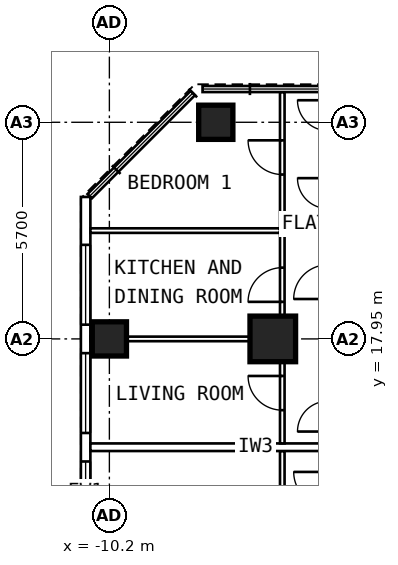
"""IFC4 building model, lengths in metres.
Left out: names, types, materials, properties, quantities, classifications, styles, units other than length and angle.
Written with IfcOpenShell. Run it as: python <this file> out.ifc"""

import sys

from ifc_helpers import new_model, si_unit, direction, frame, frame_2d, origin, origin_2d, place, context, subcontext, project, spatial, rectangle, extrude, element, fill, save


model = new_model("IFC4")
c1 = context("Model", 3, precision=1e-05, world=origin(), true_north=direction((0.0, 1.0)))
c2 = subcontext(c1, "Body", "Model", "MODEL_VIEW")
j1 = project(units=[si_unit("LENGTHUNIT", "METRE"), si_unit("PLANEANGLEUNIT", "RADIAN")], contexts=[c1])
p1 = place(None, origin())
s1 = spatial("IfcSite", under=j1, at=p1, CompositionType="ELEMENT")
p2 = place(p1, origin())
s2 = spatial("IfcBuilding", under=s1, at=p2, CompositionType="ELEMENT")
p3 = place(p2, frame((0.0, 0.0, 172.4)))
s3 = spatial("IfcBuildingStorey", under=s2, at=p3, CompositionType="ELEMENT", Elevation=172.4)
for number, where, z_axis, x_axis in (
    (1, (-10.2, 17.95, 0.0), (0.0, 0.0, 1.0), (0.0, 1.0, 0.0)),
    (2, (-7.4, 23.65, 0.0), (0.0, 0.0, 1.0), (0.0, 1.0, 0.0)),
):
    element("IfcColumn", number, at=place(p3, frame(where, z_axis=z_axis, x_axis=x_axis)), inside=s3, PredefinedType="COLUMN", context=c2, shape_type="SweptSolid", body=[
        extrude(rectangle(XDim=0.9, YDim=0.9, at=origin_2d()), origin(), (0.0, 0.0, 1.0), 3.6),
    ])
p4 = place(p3, frame((-5.9, 17.95, 0.0), z_axis=(0.0, 0.0, 1.0), x_axis=(0.0, 1.0, 0.0)))
e3 = element("IfcColumn", 3, at=p4, inside=s3, PredefinedType="COLUMN", context=c2, shape_type="SweptSolid", body=[
    extrude(rectangle(XDim=1.2, YDim=1.2, at=origin_2d()), origin(), (0.0, 0.0, 1.0), 3.6),
])
p5 = place(p3, frame((-10.825, 6.148, 0.0), z_axis=(0.0, 0.0, 1.0), x_axis=(0.0, 1.0, 0.0)))
e4 = element("IfcWall", 4, at=p5, inside=s3, PredefinedType="SOLIDWALL", context=c2, shape_type="SweptSolid", body=[
    extrude(rectangle(XDim=15.537, YDim=0.25, at=frame_2d((7.769, 0.0))), origin(), (0.0, 0.0, 1.0), 3.35),
])
p6 = place(p5, frame((0.777, 0.0, 0.8)))
e5 = element("IfcOpeningElement", 5, at=p6, cuts=e4, PredefinedType="OPENING", context=c2, shape_type="SweptSolid", body=[
    extrude(rectangle(XDim=2.1, YDim=1.8, at=frame_2d((1.05, 0.9))), frame((0.0, 0.137, 0.0), z_axis=(0.0, -1.0, 0.0), x_axis=(1.0, 0.0, 0.0)), (0.0, 0.0, 1.0), 0.274),
])
p7 = place(p5, frame((3.627, 0.0, 0.8)))
e6 = element("IfcOpeningElement", 6, at=p7, cuts=e4, PredefinedType="OPENING", context=c2, shape_type="SweptSolid", body=[
    extrude(rectangle(XDim=2.1, YDim=1.8, at=frame_2d((1.05, 0.9))), frame((0.0, 0.137, 0.0), z_axis=(0.0, -1.0, 0.0), x_axis=(1.0, 0.0, 0.0)), (0.0, 0.0, 1.0), 0.274),
])
p8 = place(p5, frame((6.477, 0.0, 0.8)))
e7 = element("IfcOpeningElement", 7, at=p8, cuts=e4, PredefinedType="OPENING", context=c2, shape_type="SweptSolid", body=[
    extrude(rectangle(XDim=2.1, YDim=1.8, at=frame_2d((1.05, 0.9))), frame((0.0, 0.137, 0.0), z_axis=(0.0, -1.0, 0.0), x_axis=(1.0, 0.0, 0.0)), (0.0, 0.0, 1.0), 0.274),
])
p9 = place(p5, frame((9.327, 0.0, 0.8)))
e8 = element("IfcOpeningElement", 8, at=p9, cuts=e4, PredefinedType="OPENING", context=c2, shape_type="SweptSolid", body=[
    extrude(rectangle(XDim=2.1, YDim=1.8, at=frame_2d((1.05, 0.9))), frame((0.0, 0.137, 0.0), z_axis=(0.0, -1.0, 0.0), x_axis=(1.0, 0.0, 0.0)), (0.0, 0.0, 1.0), 0.274),
])
p10 = place(p5, frame((12.177, 0.0, 0.8)))
e9 = element("IfcOpeningElement", 9, at=p10, cuts=e4, PredefinedType="OPENING", context=c2, shape_type="SweptSolid", body=[
    extrude(rectangle(XDim=2.1, YDim=1.8, at=frame_2d((1.05, 0.9))), frame((0.0, 0.137, 0.0), z_axis=(0.0, -1.0, 0.0), x_axis=(1.0, 0.0, 0.0)), (0.0, 0.0, 1.0), 0.274),
])
p11 = place(p3, frame((-5.65, 9.6, 0.0), z_axis=(0.0, 0.0, 1.0), x_axis=(0.0, 1.0, 0.0)))
e10 = element("IfcWall", 10, at=p11, inside=s3, PredefinedType="PARTITIONING", context=c2, shape_type="SweptSolid", body=[
    extrude(rectangle(XDim=5.4, YDim=0.12, at=frame_2d((2.7, 0.0))), origin(), (0.0, 0.0, 1.0), 3.35),
])
p12 = place(p11, frame((3.4, 0.0, 0.0)))
e11 = element("IfcOpeningElement", 11, at=p12, cuts=e10, PredefinedType="OPENING", context=c2, shape_type="SweptSolid", body=[
    extrude(rectangle(XDim=0.9, YDim=2.1, at=frame_2d((0.45, 1.05))), frame((0.0, 0.072, 0.0), z_axis=(0.0, -1.0, 0.0), x_axis=(1.0, 0.0, 0.0)), (0.0, 0.0, 1.0), 0.144),
])
p13 = place(p3, frame((-5.65, 15.2, 0.0), z_axis=(0.0, 0.0, 1.0), x_axis=(0.0, 1.0, 0.0)))
e12 = element("IfcWall", 12, at=p13, inside=s3, PredefinedType="PARTITIONING", context=c2, shape_type="SweptSolid", body=[
    extrude(rectangle(XDim=9.245, YDim=0.12, at=frame_2d((4.623, 0.0))), origin(), (0.0, 0.0, 1.0), 3.35),
])
p14 = place(p13, frame((0.875, 0.0, 0.0)))
e13 = element("IfcOpeningElement", 13, at=p14, cuts=e12, PredefinedType="OPENING", context=c2, shape_type="SweptSolid", body=[
    extrude(rectangle(XDim=0.9, YDim=2.1, at=frame_2d((0.45, 1.05))), frame((0.0, 0.072, 0.0), z_axis=(0.0, -1.0, 0.0), x_axis=(1.0, 0.0, 0.0)), (0.0, 0.0, 1.0), 0.144),
])
p15 = place(p13, frame((3.725, 0.0, 0.0)))
e14 = element("IfcOpeningElement", 14, at=p15, cuts=e12, PredefinedType="OPENING", context=c2, shape_type="SweptSolid", body=[
    extrude(rectangle(XDim=0.9, YDim=2.1, at=frame_2d((0.45, 1.05))), frame((0.0, 0.072, 0.0), z_axis=(0.0, -1.0, 0.0), x_axis=(1.0, 0.0, 0.0)), (0.0, 0.0, 1.0), 0.144),
])
p16 = place(p13, frame((7.075, 0.0, 0.0)))
e15 = element("IfcOpeningElement", 15, at=p16, cuts=e12, PredefinedType="OPENING", context=c2, shape_type="SweptSolid", body=[
    extrude(rectangle(XDim=0.9, YDim=2.1, at=frame_2d((0.45, 1.05))), frame((0.0, 0.072, 0.0), z_axis=(0.0, -1.0, 0.0), x_axis=(1.0, 0.0, 0.0)), (0.0, 0.0, 1.0), 0.144),
])
p17 = place(p3, frame((-5.71, 17.95, 0.0), z_axis=(0.0, 0.0, 1.0), x_axis=(-1.0, 0.0, 0.0)))
e16 = element("IfcWall", 16, at=p17, inside=s3, PredefinedType="PARTITIONING", context=c2, shape_type="SweptSolid", body=[
    extrude(rectangle(XDim=4.99, YDim=0.12, at=frame_2d((2.495, 0.0))), origin(), (0.0, 0.0, 1.0), 2.45),
])
p18 = place(p3, frame((-5.71, 20.8, 0.0), z_axis=(0.0, 0.0, 1.0), x_axis=(-1.0, 0.0, 0.0)))
e17 = element("IfcWall", 17, at=p18, inside=s3, PredefinedType="PARTITIONING", context=c2, shape_type="SweptSolid", body=[
    extrude(rectangle(XDim=4.99, YDim=0.12, at=frame_2d((2.495, 0.0))), origin(), (0.0, 0.0, 1.0), 3.35),
])
p19 = place(p3, frame((-2.0, 15.1, 0.0), z_axis=(0.0, 0.0, 1.0), x_axis=(-1.0, 0.0, 0.0)))
e18 = element("IfcWall", 18, at=p19, inside=s3, PredefinedType="PARTITIONING", context=c2, shape_type="SweptSolid", body=[
    extrude(rectangle(XDim=8.7, YDim=0.2, at=frame_2d((4.35, 0.0))), origin(), (0.0, 0.0, 1.0), 3.35),
])
p20 = place(p8, origin())
e19 = element("IfcWindow", 19, at=p20, inside=s3, PartitioningType="SINGLE_PANEL", PredefinedType="WINDOW", context=c2, shape_type="SweptSolid", body=[
    extrude(rectangle(XDim=2.1, YDim=1.8, at=frame_2d((1.05, 0.9))), frame((0.0, 0.03, 0.0), z_axis=(0.0, -1.0, 0.0), x_axis=(1.0, 0.0, 0.0)), (0.0, 0.0, 1.0), 0.06),
])
fill(e7, e19)
p21 = place(p9, origin())
e20 = element("IfcWindow", 20, at=p21, inside=s3, PartitioningType="SINGLE_PANEL", PredefinedType="WINDOW", context=c2, shape_type="SweptSolid", body=[
    extrude(rectangle(XDim=2.1, YDim=1.8, at=frame_2d((1.05, 0.9))), frame((0.0, 0.03, 0.0), z_axis=(0.0, -1.0, 0.0), x_axis=(1.0, 0.0, 0.0)), (0.0, 0.0, 1.0), 0.06),
])
fill(e8, e20)
p22 = place(p10, origin())
e21 = element("IfcWindow", 21, at=p22, inside=s3, PartitioningType="SINGLE_PANEL", PredefinedType="WINDOW", context=c2, shape_type="SweptSolid", body=[
    extrude(rectangle(XDim=2.1, YDim=1.8, at=frame_2d((1.05, 0.9))), frame((0.0, 0.03, 0.0), z_axis=(0.0, -1.0, 0.0), x_axis=(1.0, 0.0, 0.0)), (0.0, 0.0, 1.0), 0.06),
])
fill(e9, e21)
p23 = place(p14, origin())
e22 = element("IfcDoor", 22, at=p23, inside=s3, OperationType="SINGLE_SWING_RIGHT", PredefinedType="DOOR", context=c2, shape_type="SweptSolid", body=[
    extrude(rectangle(XDim=0.9, YDim=2.1, at=frame_2d((0.45, 1.05))), frame((0.0, 0.025, 0.0), z_axis=(0.0, -1.0, 0.0), x_axis=(1.0, 0.0, 0.0)), (0.0, 0.0, 1.0), 0.05),
])
fill(e13, e22)
p24 = place(p15, origin())
e23 = element("IfcDoor", 23, at=p24, inside=s3, OperationType="SINGLE_SWING_LEFT", PredefinedType="DOOR", context=c2, shape_type="SweptSolid", body=[
    extrude(rectangle(XDim=0.9, YDim=2.1, at=frame_2d((0.45, 1.05))), frame((0.0, 0.025, 0.0), z_axis=(0.0, -1.0, 0.0), x_axis=(1.0, 0.0, 0.0)), (0.0, 0.0, 1.0), 0.05),
])
fill(e14, e23)
p25 = place(p16, origin())
e24 = element("IfcDoor", 24, at=p25, inside=s3, OperationType="SINGLE_SWING_RIGHT", PredefinedType="DOOR", context=c2, shape_type="SweptSolid", body=[
    extrude(rectangle(XDim=0.9, YDim=2.1, at=frame_2d((0.45, 1.05))), frame((0.0, 0.025, 0.0), z_axis=(0.0, -1.0, 0.0), x_axis=(1.0, 0.0, 0.0)), (0.0, 0.0, 1.0), 0.05),
])
fill(e15, e24)
save(model, sys.argv[1])
